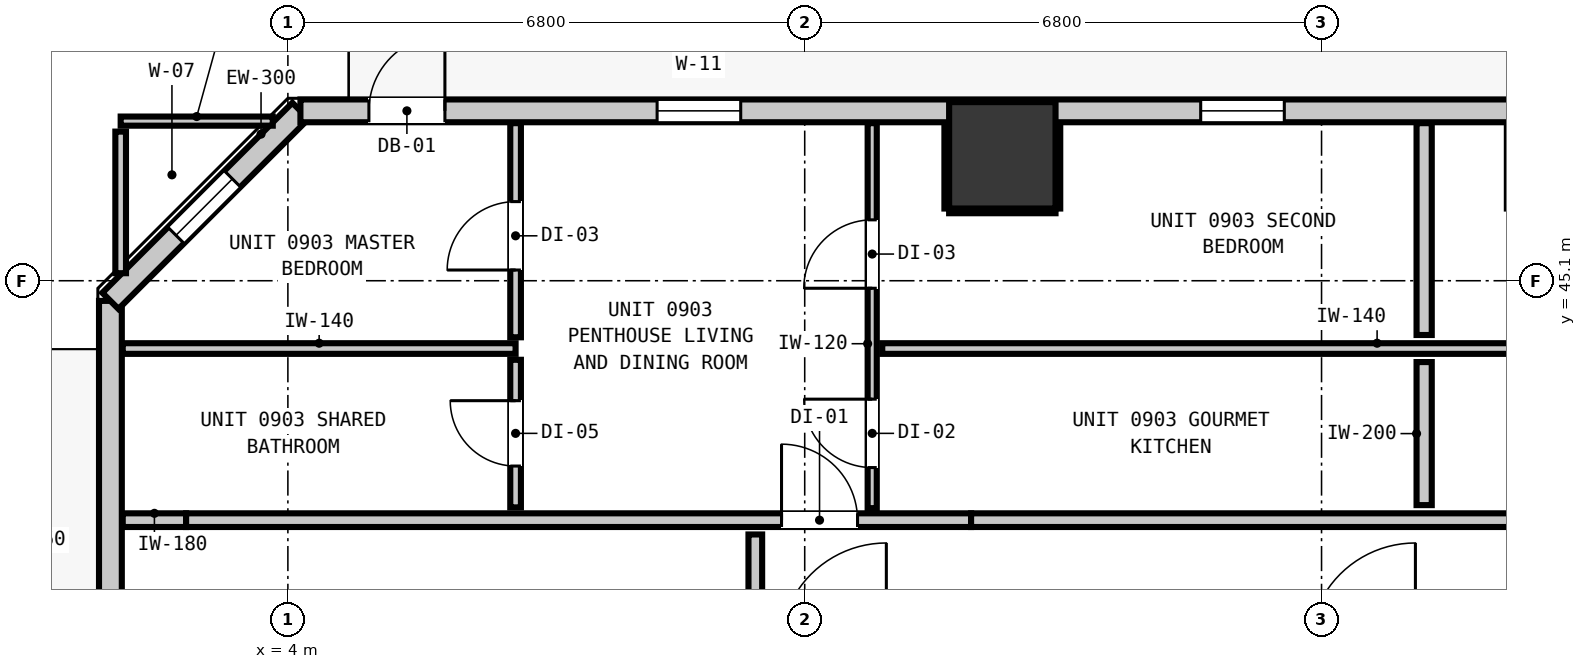
"""IFC4 building model, lengths in metres.
Left out: names, types, materials, properties, quantities, classifications, styles, units other than length and angle.
Written with IfcOpenShell. Run it as: python <this file> out.ifc"""

import sys

from ifc_helpers import new_model, si_unit, direction, frame, frame_2d, origin, origin_2d, place, context, subcontext, project, spatial, rectangle, extrude, element, fill, save


model = new_model("IFC4")
c1 = context("Model", 3, precision=1e-05, world=origin(), true_north=direction((0.0, 1.0)))
c2 = subcontext(c1, "Body", "Model", "MODEL_VIEW")
j1 = project(units=[si_unit("LENGTHUNIT", "METRE"), si_unit("PLANEANGLEUNIT", "RADIAN")], contexts=[c1])
p1 = place(None, origin())
s1 = spatial("IfcSite", under=j1, at=p1, CompositionType="ELEMENT")
p2 = place(p1, origin())
s2 = spatial("IfcBuilding", under=s1, at=p2, CompositionType="ELEMENT")
p3 = place(p2, frame((0.0, 0.0, 35.28)))
s3 = spatial("IfcBuildingStorey", under=s2, at=p3, CompositionType="ELEMENT", Elevation=35.28)
p4 = place(p3, frame((13.4, 46.75, 0.0), z_axis=(0.0, 0.0, 1.0), x_axis=(1.0, 0.0, 0.0)))
e1 = element("IfcColumn", 1, at=p4, inside=s3, PredefinedType="COLUMN", context=c2, shape_type="SweptSolid", body=[
    extrude(rectangle(XDim=1.4, YDim=1.4, at=origin_2d()), origin(), (0.0, 0.0, 1.0), 3.32),
])
p5 = place(p3, frame((1.665, 10.165, 0.0), z_axis=(0.0, 0.0, 1.0), x_axis=(0.0, 1.0, 0.0)))
e2 = element("IfcWall", 2, at=p5, inside=s3, PredefinedType="STANDARD", context=c2, shape_type="SweptSolid", body=[
    extrude(rectangle(XDim=34.67, YDim=0.3, at=frame_2d((17.335, 0.0))), origin(), (0.0, 0.0, 1.0), 3.06),
])
p6 = place(p5, frame((0.901, 0.0, 0.0)))
e3 = element("IfcOpeningElement", 3, at=p6, cuts=e2, PredefinedType="OPENING", context=c2, shape_type="SweptSolid", body=[
    extrude(rectangle(XDim=1.0, YDim=2.15, at=frame_2d((0.5, 1.075))), frame((0.0, 0.16, 0.0), z_axis=(0.0, -1.0, 0.0), x_axis=(1.0, 0.0, 0.0)), (0.0, 0.0, 1.0), 0.32),
])
p7 = place(p5, frame((17.825, 0.0, 0.85)))
e4 = element("IfcOpeningElement", 4, at=p7, cuts=e2, PredefinedType="OPENING", context=c2, shape_type="SweptSolid", body=[
    extrude(rectangle(XDim=1.1, YDim=2.05, at=frame_2d((0.55, 1.025))), frame((0.0, 0.16, 0.0), z_axis=(0.0, -1.0, 0.0), x_axis=(1.0, 0.0, 0.0)), (0.0, 0.0, 1.0), 0.32),
])
p8 = place(p5, frame((13.975, 0.0, 0.85)))
e5 = element("IfcOpeningElement", 5, at=p8, cuts=e2, PredefinedType="OPENING", context=c2, shape_type="SweptSolid", body=[
    extrude(rectangle(XDim=1.1, YDim=2.05, at=frame_2d((0.55, 1.025))), frame((0.0, 0.16, 0.0), z_axis=(0.0, -1.0, 0.0), x_axis=(1.0, 0.0, 0.0)), (0.0, 0.0, 1.0), 0.32),
])
p9 = place(p5, frame((25.995, 0.0, 0.85)))
e6 = element("IfcOpeningElement", 6, at=p9, cuts=e2, PredefinedType="OPENING", context=c2, shape_type="SweptSolid", body=[
    extrude(rectangle(XDim=1.1, YDim=2.05, at=frame_2d((0.55, 1.025))), frame((0.0, 0.16, 0.0), z_axis=(0.0, -1.0, 0.0), x_axis=(1.0, 0.0, 0.0)), (0.0, 0.0, 1.0), 0.32),
])
p10 = place(p3, frame((1.665, 44.835, 0.0), z_axis=(0.0, 0.0, 1.0), x_axis=(0.707106781187, 0.707106781187, 0.0)))
e7 = element("IfcWall", 7, at=p10, inside=s3, PredefinedType="STANDARD", context=c2, shape_type="SweptSolid", body=[
    extrude(rectangle(XDim=3.536, YDim=0.3, at=frame_2d((1.768, 0.0))), origin(), (0.0, 0.0, 1.0), 3.06),
])
p11 = place(p10, frame((1.22, 0.0, 0.85)))
e8 = element("IfcOpeningElement", 8, at=p11, cuts=e7, PredefinedType="OPENING", context=c2, shape_type="SweptSolid", body=[
    extrude(rectangle(XDim=1.05, YDim=1.65, at=frame_2d((0.525, 0.825))), frame((0.0, 0.16, 0.0), z_axis=(0.0, -1.0, 0.0), x_axis=(1.0, 0.0, 0.0)), (0.0, 0.0, 1.0), 0.32),
])
p12 = place(p3, frame((4.165, 47.335, 0.0), z_axis=(0.0, 0.0, 1.0), x_axis=(1.0, 0.0, 0.0)))
e9 = element("IfcWall", 9, at=p12, inside=s3, PredefinedType="STANDARD", context=c2, shape_type="SweptSolid", body=[
    extrude(rectangle(XDim=37.47, YDim=0.3, at=frame_2d((18.735, 0.0))), origin(), (0.0, 0.0, 1.0), 3.06),
])
p13 = place(p12, frame((0.901, 0.0, 0.0)))
e10 = element("IfcOpeningElement", 10, at=p13, cuts=e9, PredefinedType="OPENING", context=c2, shape_type="SweptSolid", body=[
    extrude(rectangle(XDim=1.0, YDim=2.15, at=frame_2d((0.5, 1.075))), frame((0.0, 0.16, 0.0), z_axis=(0.0, -1.0, 0.0), x_axis=(1.0, 0.0, 0.0)), (0.0, 0.0, 1.0), 0.32),
])
p14 = place(p12, frame((4.693, 0.0, 0.85)))
e11 = element("IfcOpeningElement", 11, at=p14, cuts=e9, PredefinedType="OPENING", context=c2, shape_type="SweptSolid", body=[
    extrude(rectangle(XDim=1.1, YDim=2.05, at=frame_2d((0.55, 1.025))), frame((0.0, 0.16, 0.0), z_axis=(0.0, -1.0, 0.0), x_axis=(1.0, 0.0, 0.0)), (0.0, 0.0, 1.0), 0.32),
])
p15 = place(p12, frame((11.845, 0.0, 0.85)))
e12 = element("IfcOpeningElement", 12, at=p15, cuts=e9, PredefinedType="OPENING", context=c2, shape_type="SweptSolid", body=[
    extrude(rectangle(XDim=1.1, YDim=2.05, at=frame_2d((0.55, 1.025))), frame((0.0, 0.16, 0.0), z_axis=(0.0, -1.0, 0.0), x_axis=(1.0, 0.0, 0.0)), (0.0, 0.0, 1.0), 0.32),
])
p16 = place(p12, frame((22.006, 0.0, 0.85)))
e13 = element("IfcOpeningElement", 13, at=p16, cuts=e9, PredefinedType="OPENING", context=c2, shape_type="SweptSolid", body=[
    extrude(rectangle(XDim=1.1, YDim=2.05, at=frame_2d((0.55, 1.025))), frame((0.0, 0.16, 0.0), z_axis=(0.0, -1.0, 0.0), x_axis=(1.0, 0.0, 0.0)), (0.0, 0.0, 1.0), 0.32),
])
p17 = place(p12, frame((18.406, 0.0, 0.85)))
e14 = element("IfcOpeningElement", 14, at=p17, cuts=e9, PredefinedType="OPENING", context=c2, shape_type="SweptSolid", body=[
    extrude(rectangle(XDim=1.1, YDim=2.05, at=frame_2d((0.55, 1.025))), frame((0.0, 0.16, 0.0), z_axis=(0.0, -1.0, 0.0), x_axis=(1.0, 0.0, 0.0)), (0.0, 0.0, 1.0), 0.32),
])
p18 = place(p12, frame((29.388, 0.0, 0.85)))
e15 = element("IfcOpeningElement", 15, at=p18, cuts=e9, PredefinedType="OPENING", context=c2, shape_type="SweptSolid", body=[
    extrude(rectangle(XDim=1.1, YDim=2.05, at=frame_2d((0.55, 1.025))), frame((0.0, 0.16, 0.0), z_axis=(0.0, -1.0, 0.0), x_axis=(1.0, 0.0, 0.0)), (0.0, 0.0, 1.0), 0.32),
])
p19 = place(p12, frame((35.535, 0.0, 0.85)))
e16 = element("IfcOpeningElement", 16, at=p19, cuts=e9, PredefinedType="OPENING", context=c2, shape_type="SweptSolid", body=[
    extrude(rectangle(XDim=1.1, YDim=2.05, at=frame_2d((0.55, 1.025))), frame((0.0, 0.16, 0.0), z_axis=(0.0, -1.0, 0.0), x_axis=(1.0, 0.0, 0.0)), (0.0, 0.0, 1.0), 0.32),
])
p20 = place(p3, frame((1.827, 41.95, 0.0), z_axis=(0.0, 0.0, 1.0), x_axis=(1.0, 0.0, 0.0)))
e17 = element("IfcWall", 17, at=p20, inside=s3, PredefinedType="PARTITIONING", context=c2, shape_type="SweptSolid", body=[
    extrude(rectangle(XDim=0.834, YDim=0.18, at=frame_2d((0.417, 0.0))), origin(), (0.0, 0.0, 1.0), 3.06),
])
p21 = place(p3, frame((2.661, 41.95, 0.0), z_axis=(0.0, 0.0, 1.0), x_axis=(1.0, 0.0, 0.0)))
e18 = element("IfcWall", 18, at=p21, inside=s3, PredefinedType="PARTITIONING", context=c2, shape_type="SweptSolid", body=[
    extrude(rectangle(XDim=10.328, YDim=0.18, at=frame_2d((5.164, 0.0))), origin(), (0.0, 0.0, 1.0), 2.445),
])
p22 = place(p21, frame((7.834, 0.0, 0.0)))
e19 = element("IfcOpeningElement", 19, at=p22, cuts=e18, PredefinedType="OPENING", context=c2, shape_type="SweptSolid", body=[
    extrude(rectangle(XDim=1.0, YDim=2.15, at=frame_2d((0.5, 1.075))), frame((0.0, 0.1, 0.0), z_axis=(0.0, -1.0, 0.0), x_axis=(1.0, 0.0, 0.0)), (0.0, 0.0, 1.0), 0.2),
])
p23 = place(p3, frame((12.989, 41.95, 0.0), z_axis=(0.0, 0.0, 1.0), x_axis=(1.0, 0.0, 0.0)))
e20 = element("IfcWall", 20, at=p23, inside=s3, PredefinedType="PARTITIONING", context=c2, shape_type="SweptSolid", body=[
    extrude(rectangle(XDim=30.984, YDim=0.18, at=frame_2d((15.492, 0.0))), origin(), (0.0, 0.0, 1.0), 3.06),
])
p24 = place(p23, frame((14.765, 0.0, 0.0)))
e21 = element("IfcOpeningElement", 21, at=p24, cuts=e20, PredefinedType="OPENING", context=c2, shape_type="SweptSolid", body=[
    extrude(rectangle(XDim=1.0, YDim=2.15, at=frame_2d((0.5, 1.075))), frame((0.0, 0.1, 0.0), z_axis=(0.0, -1.0, 0.0), x_axis=(1.0, 0.0, 0.0)), (0.0, 0.0, 1.0), 0.2),
])
p25 = place(p3, frame((1.827, 44.208, 0.0), z_axis=(0.0, 0.0, 1.0), x_axis=(1.0, 0.0, 0.0)))
e22 = element("IfcWall", 22, at=p25, inside=s3, PredefinedType="PARTITIONING", context=c2, shape_type="SweptSolid", body=[
    extrude(rectangle(XDim=5.169, YDim=0.14, at=frame_2d((2.584, 0.0))), origin(), (0.0, 0.0, 1.0), 3.06),
])
p26 = place(p3, frame((11.82, 44.208, 0.0), z_axis=(0.0, 0.0, 1.0), x_axis=(1.0, 0.0, 0.0)))
e23 = element("IfcWall", 23, at=p26, inside=s3, PredefinedType="PARTITIONING", context=c2, shape_type="SweptSolid", body=[
    extrude(rectangle(XDim=13.022, YDim=0.14, at=frame_2d((6.511, 0.0))), origin(), (0.0, 0.0, 1.0), 3.06),
])
p27 = place(p3, frame((1.8, 47.2, 0.0), z_axis=(0.0, 0.0, 1.0), x_axis=(1.0, 0.0, 0.0)))
e24 = element("IfcWall", 24, at=p27, inside=s3, PredefinedType="PARTITIONING", context=c2, shape_type="SweptSolid", body=[
    extrude(rectangle(XDim=2.001, YDim=0.12, at=frame_2d((1.0, 0.0))), origin(), (0.0, 0.0, 1.0), 3.06),
])
p28 = place(p3, frame((18.95, 42.148, 0.0), z_axis=(0.0, 0.0, 1.0), x_axis=(0.0, 1.0, 0.0)))
e25 = element("IfcWall", 25, at=p28, inside=s3, PredefinedType="PARTITIONING", context=c2, shape_type="SweptSolid", body=[
    extrude(rectangle(XDim=1.882, YDim=0.2, at=frame_2d((0.941, 0.0))), origin(), (0.0, 0.0, 1.0), 3.06),
])
p29 = place(p3, frame((18.95, 44.386, 0.0), z_axis=(0.0, 0.0, 1.0), x_axis=(0.0, 1.0, 0.0)))
e26 = element("IfcWall", 26, at=p29, inside=s3, PredefinedType="PARTITIONING", context=c2, shape_type="SweptSolid", body=[
    extrude(rectangle(XDim=2.787, YDim=0.2, at=frame_2d((1.394, 0.0))), origin(), (0.0, 0.0, 1.0), 3.06),
])
p30 = place(p3, frame((10.15, 40.438, 0.0), z_axis=(0.0, 0.0, 1.0), x_axis=(0.0, 1.0, 0.0)))
e27 = element("IfcWall", 27, at=p30, inside=s3, PredefinedType="PARTITIONING", context=c2, shape_type="SweptSolid", body=[
    extrude(rectangle(XDim=1.324, YDim=0.18, at=frame_2d((0.662, 0.0))), origin(), (0.0, 0.0, 1.0), 3.06),
])
p31 = place(p3, frame((1.8, 45.199, 0.0), z_axis=(0.0, 0.0, 1.0), x_axis=(0.0, 1.0, 0.0)))
e28 = element("IfcWall", 28, at=p31, inside=s3, PredefinedType="PARTITIONING", context=c2, shape_type="SweptSolid", body=[
    extrude(rectangle(XDim=1.863, YDim=0.14, at=frame_2d((0.932, 0.0))), origin(), (0.0, 0.0, 1.0), 3.06),
])
p32 = place(p3, frame((6.996, 42.118, 0.0), z_axis=(0.0, 0.0, 1.0), x_axis=(0.0, 1.0, 0.0)))
e29 = element("IfcWall", 29, at=p32, inside=s3, PredefinedType="PARTITIONING", context=c2, shape_type="SweptSolid", body=[
    extrude(rectangle(XDim=1.942, YDim=0.14, at=frame_2d((0.971, 0.0))), origin(), (0.0, 0.0, 1.0), 3.06),
])
p33 = place(p32, frame((0.544, 0.0, 0.0)))
e30 = element("IfcOpeningElement", 30, at=p33, cuts=e29, PredefinedType="OPENING", context=c2, shape_type="SweptSolid", body=[
    extrude(rectangle(XDim=0.86, YDim=2.02, at=frame_2d((0.43, 1.01))), frame((0.0, 0.08, 0.0), z_axis=(0.0, -1.0, 0.0), x_axis=(1.0, 0.0, 0.0)), (0.0, 0.0, 1.0), 0.16),
])
p34 = place(p3, frame((6.996, 44.356, 0.0), z_axis=(0.0, 0.0, 1.0), x_axis=(0.0, 1.0, 0.0)))
e31 = element("IfcWall", 31, at=p34, inside=s3, PredefinedType="PARTITIONING", context=c2, shape_type="SweptSolid", body=[
    extrude(rectangle(XDim=2.817, YDim=0.14, at=frame_2d((1.409, 0.0))), origin(), (0.0, 0.0, 1.0), 3.06),
])
p35 = place(p34, frame((0.885, 0.0, 0.0)))
e32 = element("IfcOpeningElement", 32, at=p35, cuts=e31, PredefinedType="OPENING", context=c2, shape_type="SweptSolid", body=[
    extrude(rectangle(XDim=0.9, YDim=2.1, at=frame_2d((0.45, 1.05))), frame((0.0, 0.08, 0.0), z_axis=(0.0, -1.0, 0.0), x_axis=(1.0, 0.0, 0.0)), (0.0, 0.0, 1.0), 0.16),
])
p36 = place(p3, frame((11.688, 42.108, 0.0), z_axis=(0.0, 0.0, 1.0), x_axis=(0.0, 1.0, 0.0)))
e33 = element("IfcWall", 33, at=p36, inside=s3, PredefinedType="PARTITIONING", context=c2, shape_type="SweptSolid", body=[
    extrude(rectangle(XDim=5.065, YDim=0.12, at=frame_2d((2.533, 0.0))), origin(), (0.0, 0.0, 1.0), 3.06),
])
p37 = place(p36, frame((0.534, 0.0, 0.0)))
e34 = element("IfcOpeningElement", 34, at=p37, cuts=e33, PredefinedType="OPENING", context=c2, shape_type="SweptSolid", body=[
    extrude(rectangle(XDim=0.9, YDim=2.1, at=frame_2d((0.45, 1.05))), frame((0.0, 0.07, 0.0), z_axis=(0.0, -1.0, 0.0), x_axis=(1.0, 0.0, 0.0)), (0.0, 0.0, 1.0), 0.14),
])
p38 = place(p36, frame((2.893, 0.0, 0.0)))
e35 = element("IfcOpeningElement", 35, at=p38, cuts=e33, PredefinedType="OPENING", context=c2, shape_type="SweptSolid", body=[
    extrude(rectangle(XDim=0.9, YDim=2.1, at=frame_2d((0.45, 1.05))), frame((0.0, 0.07, 0.0), z_axis=(0.0, -1.0, 0.0), x_axis=(1.0, 0.0, 0.0)), (0.0, 0.0, 1.0), 0.14),
])
p39 = place(p3, frame((12.7, 46.018, 0.0), z_axis=(0.0, 0.0, 1.0), x_axis=(1.0, 0.0, 0.0)))
e36 = element("IfcWall", 36, at=p39, inside=s3, PredefinedType="PARTITIONING", context=c2, shape_type="SweptSolid", body=[
    extrude(rectangle(XDim=1.4, YDim=0.06, at=frame_2d((0.7, 0.0))), origin(), (0.0, 0.0, 1.0), 1.45),
])
for number, where, z_axis, x_axis in (
    (37, (12.668, 46.05, 0.0), (0.0, 0.0, 1.0), (0.0, 1.0, 0.0)),
    (38, (14.132, 46.05, 0.0), (0.0, 0.0, 1.0), (0.0, 1.0, 0.0)),
):
    element("IfcWall", number, at=place(p3, frame(where, z_axis=z_axis, x_axis=x_axis)), inside=s3, PredefinedType="PARTITIONING", context=c2, shape_type="SweptSolid", body=[
        extrude(rectangle(XDim=1.12, YDim=0.06, at=frame_2d((0.56, 0.0))), origin(), (0.0, 0.0, 1.0), 1.45),
    ])
p40 = place(p13, origin())
e39 = element("IfcDoor", 39, at=p40, inside=s3, OperationType="SINGLE_SWING_RIGHT", PredefinedType="DOOR", context=c2, shape_type="SweptSolid", body=[
    extrude(rectangle(XDim=1.0, YDim=2.15, at=frame_2d((0.5, 1.075))), frame((0.0, 0.025, 0.0), z_axis=(0.0, -1.0, 0.0), x_axis=(1.0, 0.0, 0.0)), (0.0, 0.0, 1.0), 0.05),
])
fill(e10, e39)
p41 = place(p14, origin())
e40 = element("IfcWindow", 40, at=p41, inside=s3, PartitioningType="SINGLE_PANEL", PredefinedType="WINDOW", context=c2, shape_type="SweptSolid", body=[
    extrude(rectangle(XDim=1.1, YDim=2.05, at=frame_2d((0.55, 1.025))), frame((0.0, 0.03, 0.0), z_axis=(0.0, -1.0, 0.0), x_axis=(1.0, 0.0, 0.0)), (0.0, 0.0, 1.0), 0.06),
])
fill(e11, e40)
p42 = place(p15, origin())
e41 = element("IfcWindow", 41, at=p42, inside=s3, PartitioningType="SINGLE_PANEL", PredefinedType="WINDOW", context=c2, shape_type="SweptSolid", body=[
    extrude(rectangle(XDim=1.1, YDim=2.05, at=frame_2d((0.55, 1.025))), frame((0.0, 0.03, 0.0), z_axis=(0.0, -1.0, 0.0), x_axis=(1.0, 0.0, 0.0)), (0.0, 0.0, 1.0), 0.06),
])
fill(e12, e41)
p43 = place(p11, origin())
e42 = element("IfcWindow", 42, at=p43, inside=s3, PartitioningType="SINGLE_PANEL", PredefinedType="WINDOW", context=c2, shape_type="SweptSolid", body=[
    extrude(rectangle(XDim=1.05, YDim=1.65, at=frame_2d((0.525, 0.825))), frame((0.0, 0.03, 0.0), z_axis=(0.0, -1.0, 0.0), x_axis=(1.0, 0.0, 0.0)), (0.0, 0.0, 1.0), 0.06),
])
fill(e8, e42)
p44 = place(p22, origin())
e43 = element("IfcDoor", 43, at=p44, inside=s3, OperationType="SINGLE_SWING_LEFT", PredefinedType="DOOR", context=c2, shape_type="SweptSolid", body=[
    extrude(rectangle(XDim=1.0, YDim=2.15, at=frame_2d((0.5, 1.075))), frame((0.0, 0.025, 0.0), z_axis=(0.0, -1.0, 0.0), x_axis=(1.0, 0.0, 0.0)), (0.0, 0.0, 1.0), 0.05),
])
fill(e19, e43)
p45 = place(p33, origin())
e44 = element("IfcDoor", 44, at=p45, inside=s3, OperationType="SINGLE_SWING_RIGHT", PredefinedType="DOOR", context=c2, shape_type="SweptSolid", body=[
    extrude(rectangle(XDim=0.86, YDim=2.02, at=frame_2d((0.43, 1.01))), frame((0.0, 0.025, 0.0), z_axis=(0.0, -1.0, 0.0), x_axis=(1.0, 0.0, 0.0)), (0.0, 0.0, 1.0), 0.05),
])
fill(e30, e44)
p46 = place(p35, origin())
e45 = element("IfcDoor", 45, at=p46, inside=s3, OperationType="SINGLE_SWING_LEFT", PredefinedType="DOOR", context=c2, shape_type="SweptSolid", body=[
    extrude(rectangle(XDim=0.9, YDim=2.1, at=frame_2d((0.45, 1.05))), frame((0.0, 0.025, 0.0), z_axis=(0.0, -1.0, 0.0), x_axis=(1.0, 0.0, 0.0)), (0.0, 0.0, 1.0), 0.05),
])
fill(e32, e45)
p47 = place(p37, origin())
e46 = element("IfcDoor", 46, at=p47, inside=s3, OperationType="SINGLE_SWING_RIGHT", PredefinedType="DOOR", context=c2, shape_type="SweptSolid", body=[
    extrude(rectangle(XDim=0.9, YDim=2.1, at=frame_2d((0.45, 1.05))), frame((0.0, 0.025, 0.0), z_axis=(0.0, -1.0, 0.0), x_axis=(1.0, 0.0, 0.0)), (0.0, 0.0, 1.0), 0.05),
])
fill(e34, e46)
p48 = place(p38, origin())
e47 = element("IfcDoor", 47, at=p48, inside=s3, OperationType="SINGLE_SWING_LEFT", PredefinedType="DOOR", context=c2, shape_type="SweptSolid", body=[
    extrude(rectangle(XDim=0.9, YDim=2.1, at=frame_2d((0.45, 1.05))), frame((0.0, 0.025, 0.0), z_axis=(0.0, -1.0, 0.0), x_axis=(1.0, 0.0, 0.0)), (0.0, 0.0, 1.0), 0.05),
])
fill(e35, e47)
save(model, sys.argv[1])
